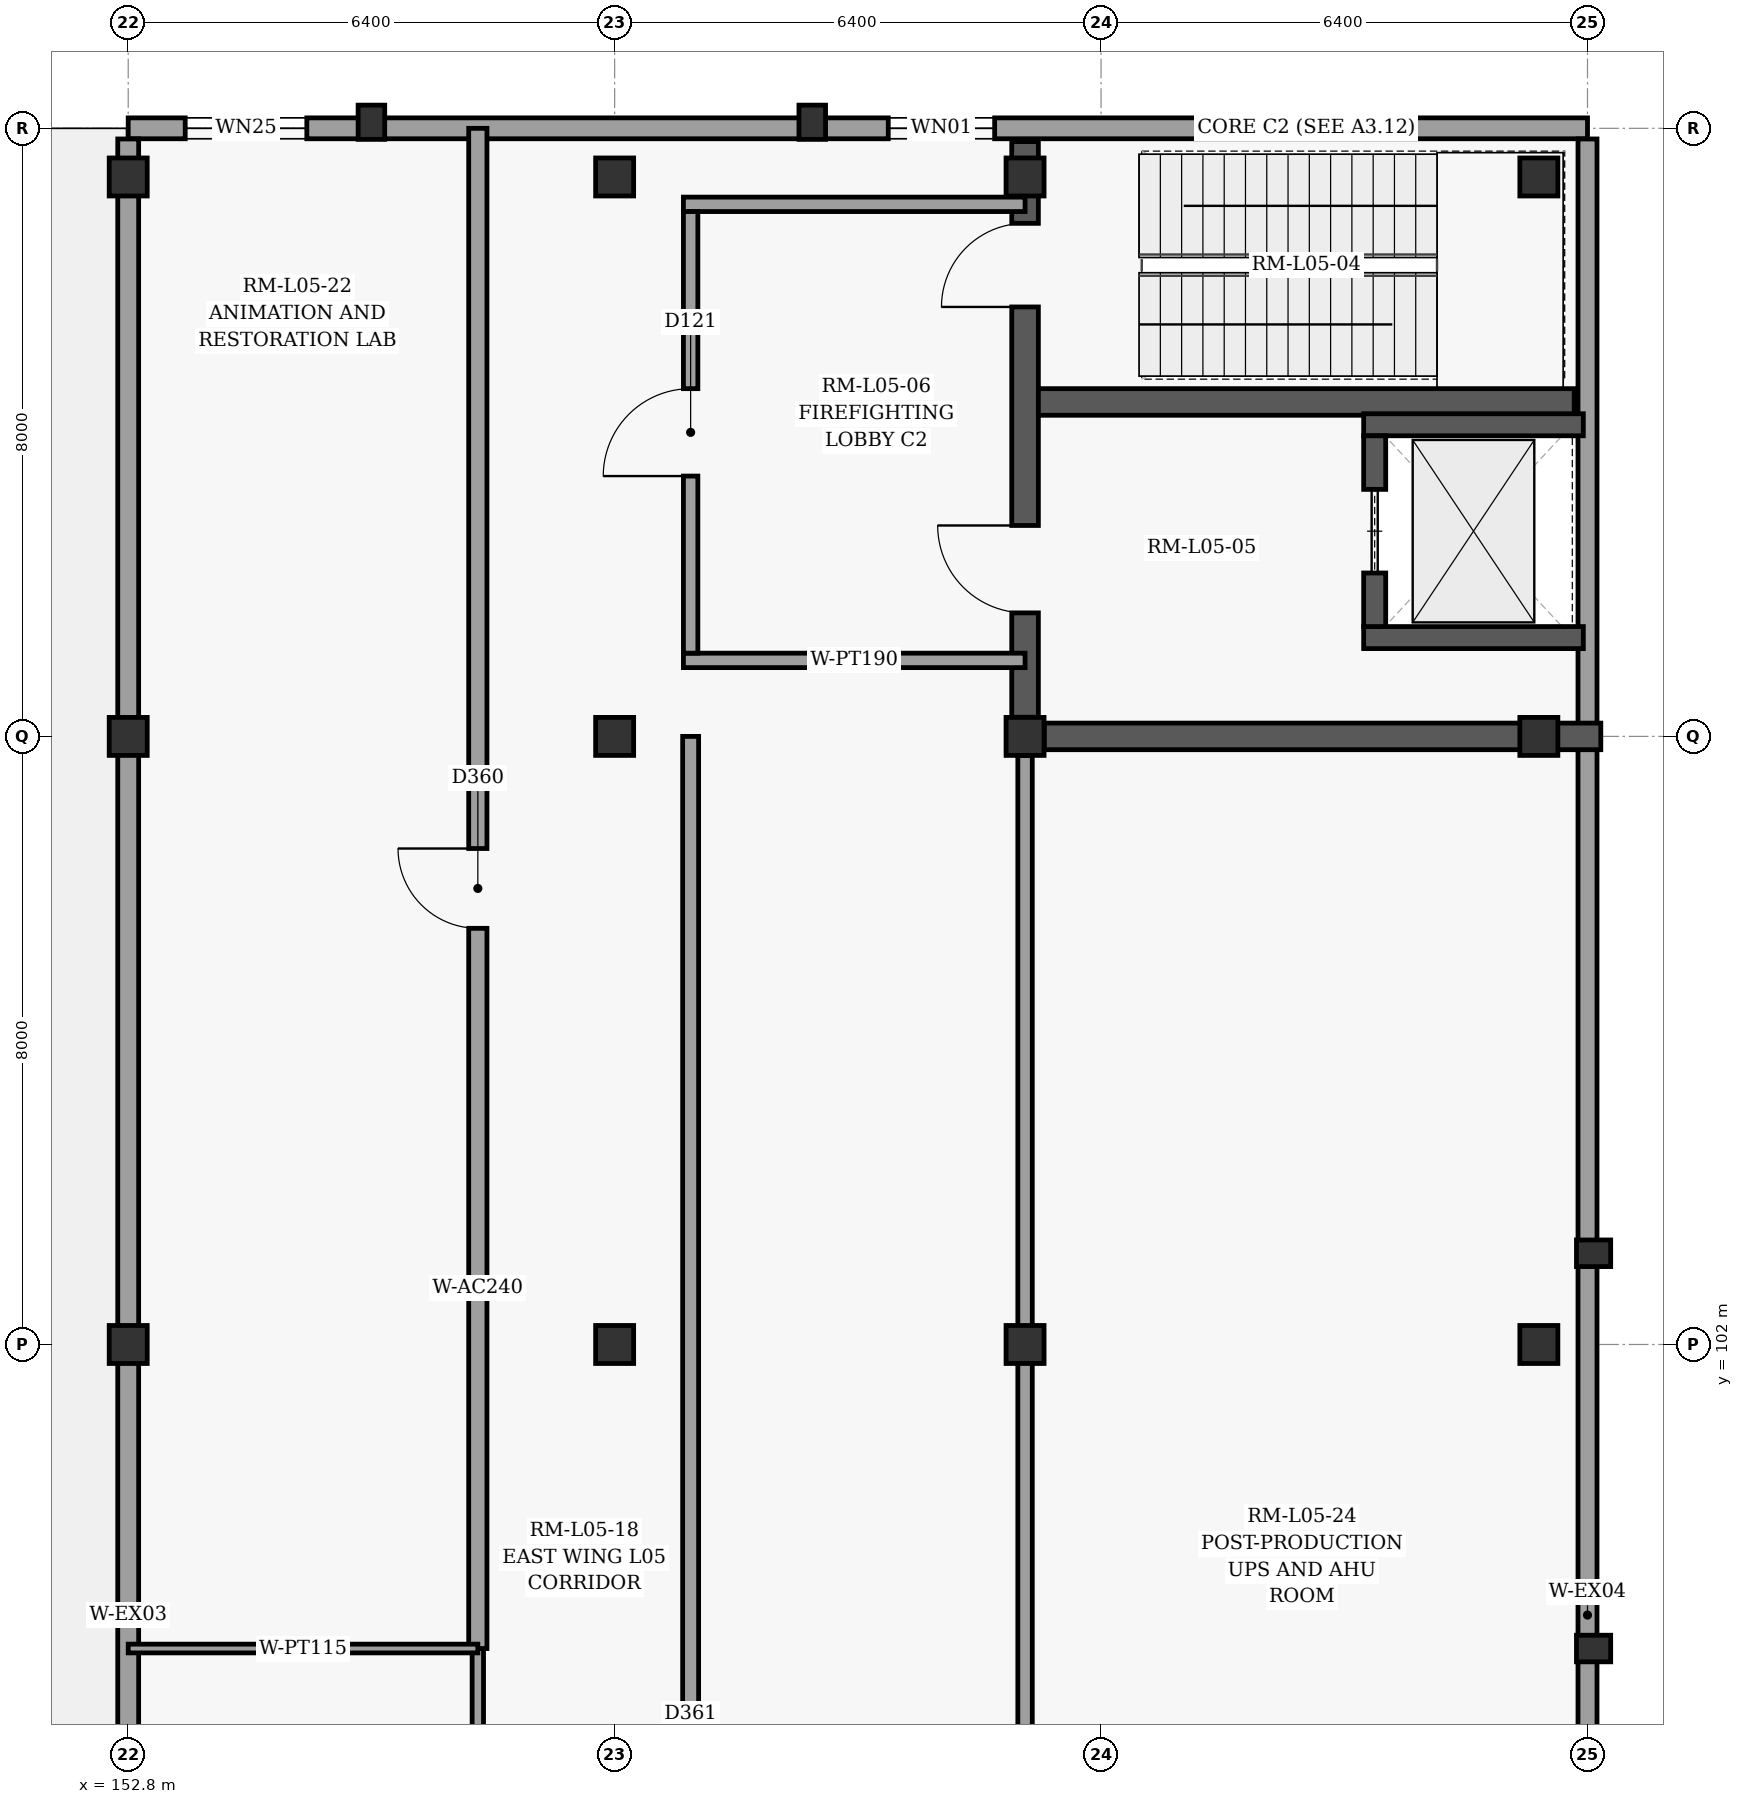
"""IFC4 building model, lengths in metres.
Left out: names, types, materials, properties, quantities, classifications, styles, units other than length and angle.
Written with IfcOpenShell. Run it as: python <this file> out.ifc"""

import sys

from ifc_helpers import new_model, si_unit, direction, frame, frame_2d, origin, origin_2d, place, context, subcontext, project, spatial, rectangle, extrude, element, fill, save


model = new_model("IFC4")
c1 = context("Model", 3, precision=1e-05, world=origin(), true_north=direction((0.0, 1.0)))
c2 = subcontext(c1, "Body", "Model", "MODEL_VIEW")
j1 = project(units=[si_unit("LENGTHUNIT", "METRE"), si_unit("PLANEANGLEUNIT", "RADIAN")], contexts=[c1])
p1 = place(None, origin())
s1 = spatial("IfcSite", under=j1, at=p1, CompositionType="ELEMENT")
p2 = place(p1, origin())
s2 = spatial("IfcBuilding", under=s1, at=p2, CompositionType="ELEMENT")
p3 = place(p2, frame((0.0, 0.0, 24.9)))
s3 = spatial("IfcBuildingStorey", under=s2, at=p3, CompositionType="ELEMENT", Elevation=24.9)
for number, where, z_axis, x_axis in (
    (1, (152.8, 102.0, 0.0), (0.0, 0.0, 1.0), (1.0, 0.0, 0.0)),
    (2, (152.8, 110.0, 0.0), (0.0, 0.0, 1.0), (1.0, 0.0, 0.0)),
    (3, (152.8, 117.36, 0.0), (0.0, 0.0, 1.0), (1.0, 0.0, 0.0)),
    (4, (159.2, 102.0, 0.0), (0.0, 0.0, 1.0), (1.0, 0.0, 0.0)),
    (5, (159.2, 110.0, 0.0), (0.0, 0.0, 1.0), (1.0, 0.0, 0.0)),
    (6, (159.2, 117.36, 0.0), (0.0, 0.0, 1.0), (1.0, 0.0, 0.0)),
    (7, (164.6, 102.0, 0.0), (0.0, 0.0, 1.0), (1.0, 0.0, 0.0)),
    (8, (164.6, 110.0, 0.0), (0.0, 0.0, 1.0), (1.0, 0.0, 0.0)),
    (9, (164.6, 117.36, 0.0), (0.0, 0.0, 1.0), (1.0, 0.0, 0.0)),
    (10, (171.36, 102.0, 0.0), (0.0, 0.0, 1.0), (1.0, 0.0, 0.0)),
    (11, (171.36, 110.0, 0.0), (0.0, 0.0, 1.0), (1.0, 0.0, 0.0)),
    (12, (171.36, 117.36, 0.0), (0.0, 0.0, 1.0), (1.0, 0.0, 0.0)),
):
    element("IfcColumn", number, at=place(p3, frame(where, z_axis=z_axis, x_axis=x_axis)), inside=s3, PredefinedType="COLUMN", context=c2, shape_type="SweptSolid", body=[
        extrude(rectangle(XDim=0.5, YDim=0.5, at=origin_2d()), origin(), (0.0, 0.0, 1.0), 4.5),
    ])
for number, where, z_axis, x_axis in (
    (13, (172.08, 98.0, 0.0), (0.0, 0.0, 1.0), (1.0, 0.0, 0.0)),
    (14, (172.08, 103.2, 0.0), (0.0, 0.0, 1.0), (1.0, 0.0, 0.0)),
    (15, (156.0, 118.08, 0.0), (0.0, 0.0, 1.0), (0.0, 1.0, 0.0)),
    (16, (161.8, 118.08, 0.0), (0.0, 0.0, 1.0), (0.0, 1.0, 0.0)),
):
    element("IfcColumn", number, at=place(p3, frame(where, z_axis=z_axis, x_axis=x_axis)), inside=s3, PredefinedType="PILASTER", context=c2, shape_type="SweptSolid", body=[
        extrude(rectangle(XDim=0.35, YDim=0.45, at=origin_2d()), origin(), (0.0, 0.0, 1.0), 4.5),
    ])
p4 = place(p3, frame((152.8, 118.0, 0.0), z_axis=(0.0, 0.0, 1.0), x_axis=(1.0, 0.0, 0.0)))
e17 = element("IfcWall", 17, at=p4, inside=s3, PredefinedType="SOLIDWALL", context=c2, shape_type="SweptSolid", body=[
    extrude(rectangle(XDim=19.2, YDim=0.275, at=frame_2d((9.6, 0.0))), origin(), (0.0, 0.0, 1.0), 4.3),
])
p5 = place(p4, frame((0.75, 0.0, 0.9)))
e18 = element("IfcOpeningElement", 18, at=p5, cuts=e17, PredefinedType="OPENING", context=c2, shape_type="SweptSolid", body=[
    extrude(rectangle(XDim=1.6, YDim=1.65, at=frame_2d((0.8, 0.825))), frame((0.0, 0.147, 0.0), z_axis=(0.0, -1.0, 0.0), x_axis=(1.0, 0.0, 0.0)), (0.0, 0.0, 1.0), 0.295),
])
p6 = place(p4, frame((10.0, 0.0, 0.9)))
e19 = element("IfcOpeningElement", 19, at=p6, cuts=e17, PredefinedType="OPENING", context=c2, shape_type="SweptSolid", body=[
    extrude(rectangle(XDim=1.4, YDim=2.1, at=frame_2d((0.7, 1.05))), frame((0.0, 0.147, 0.0), z_axis=(0.0, -1.0, 0.0), x_axis=(1.0, 0.0, 0.0)), (0.0, 0.0, 1.0), 0.295),
])
p7 = place(p3, frame((172.0, 117.86, 0.0), z_axis=(0.0, 0.0, 1.0), x_axis=(0.0, -1.0, 0.0)))
e20 = element("IfcWall", 20, at=p7, inside=s3, PredefinedType="SOLIDWALL", context=c2, shape_type="SweptSolid", body=[
    extrude(rectangle(XDim=46.12, YDim=0.25, at=frame_2d((23.06, 0.0))), origin(), (0.0, 0.0, 1.0), 4.3),
])
p8 = place(p3, frame((152.8, 71.74, 0.0), z_axis=(0.0, 0.0, 1.0), x_axis=(0.0, 1.0, 0.0)))
e21 = element("IfcWall", 21, at=p8, inside=s3, PredefinedType="SOLIDWALL", context=c2, shape_type="SweptSolid", body=[
    extrude(rectangle(XDim=46.12, YDim=0.275, at=frame_2d((23.06, 0.0))), origin(), (0.0, 0.0, 1.0), 3.45),
])
p9 = place(p3, frame((164.852, 110.0, 0.0), z_axis=(0.0, 0.0, 1.0), x_axis=(1.0, 0.0, 0.0)))
e22 = element("IfcWall", 22, at=p9, inside=s3, PredefinedType="SHEAR", context=c2, shape_type="SweptSolid", body=[
    extrude(rectangle(XDim=7.323, YDim=0.35, at=frame_2d((3.662, 0.0))), origin(), (0.0, 0.0, 1.0), 4.3),
])
p10 = place(p3, frame((164.6, 110.252, 0.0), z_axis=(0.0, 0.0, 1.0), x_axis=(0.0, 1.0, 0.0)))
e23 = element("IfcWall", 23, at=p10, inside=s3, PredefinedType="SHEAR", context=c2, shape_type="SweptSolid", body=[
    extrude(rectangle(XDim=7.573, YDim=0.35, at=frame_2d((3.787, 0.0))), origin(), (0.0, 0.0, 1.0), 4.3),
])
p11 = place(p10, frame((5.398, 0.0, 0.0)))
e24 = element("IfcOpeningElement", 24, at=p11, cuts=e23, PredefinedType="OPENING", context=c2, shape_type="SweptSolid", body=[
    extrude(rectangle(XDim=1.1, YDim=2.15, at=frame_2d((0.55, 1.075))), frame((0.0, 0.185, 0.0), z_axis=(0.0, -1.0, 0.0), x_axis=(1.0, 0.0, 0.0)), (0.0, 0.0, 1.0), 0.37),
])
p12 = place(p10, frame((1.373, 0.0, 0.0)))
e25 = element("IfcOpeningElement", 25, at=p12, cuts=e23, PredefinedType="OPENING", context=c2, shape_type="SweptSolid", body=[
    extrude(rectangle(XDim=1.15, YDim=2.2, at=frame_2d((0.575, 1.1))), frame((0.0, 0.185, 0.0), z_axis=(0.0, -1.0, 0.0), x_axis=(1.0, 0.0, 0.0)), (0.0, 0.0, 1.0), 0.37),
])
p13 = place(p3, frame((164.775, 114.4, 0.0), z_axis=(0.0, 0.0, 1.0), x_axis=(1.0, 0.0, 0.0)))
e26 = element("IfcWall", 26, at=p13, inside=s3, PredefinedType="SHEAR", context=c2, shape_type="SweptSolid", body=[
    extrude(rectangle(XDim=7.05, YDim=0.35, at=frame_2d((3.525, 0.0))), origin(), (0.0, 0.0, 1.0), 4.3),
])
for number, where, z_axis, x_axis in (
    (27, (169.055, 111.3, 0.0), (0.0, 0.0, 1.0), (1.0, 0.0, 0.0)),
    (28, (169.055, 114.1, 0.0), (0.0, 0.0, 1.0), (1.0, 0.0, 0.0)),
):
    element("IfcWall", number, at=place(p3, frame(where, z_axis=z_axis, x_axis=x_axis)), inside=s3, PredefinedType="SHEAR", context=c2, shape_type="SweptSolid", body=[
        extrude(rectangle(XDim=2.89, YDim=0.29, at=frame_2d((1.445, 0.0))), origin(), (0.0, 0.0, 1.0), 4.3),
    ])
p14 = place(p3, frame((169.2, 111.445, 0.0), z_axis=(0.0, 0.0, 1.0), x_axis=(0.0, 1.0, 0.0)))
e29 = element("IfcWall", 29, at=p14, inside=s3, PredefinedType="SHEAR", context=c2, shape_type="SweptSolid", body=[
    extrude(rectangle(XDim=2.51, YDim=0.29, at=frame_2d((1.255, 0.0))), origin(), (0.0, 0.0, 1.0), 4.3),
])
p15 = place(p14, frame((0.705, 0.0, 0.0)))
e30 = element("IfcOpeningElement", 30, at=p15, cuts=e29, PredefinedType="OPENING", context=c2, shape_type="SweptSolid", body=[
    extrude(rectangle(XDim=1.1, YDim=2.15, at=frame_2d((0.55, 1.075))), frame((0.0, 0.155, 0.0), z_axis=(0.0, -1.0, 0.0), x_axis=(1.0, 0.0, 0.0)), (0.0, 0.0, 1.0), 0.31),
])
p16 = place(p3, frame((160.105, 111.0, 0.0), z_axis=(0.0, 0.0, 1.0), x_axis=(1.0, 0.0, 0.0)))
e31 = element("IfcWall", 31, at=p16, inside=s3, PredefinedType="PARTITIONING", context=c2, shape_type="SweptSolid", body=[
    extrude(rectangle(XDim=4.495, YDim=0.19, at=frame_2d((2.248, 0.0))), origin(), (0.0, 0.0, 1.0), 4.3),
])
p17 = place(p3, frame((160.105, 117.0, 0.0), z_axis=(0.0, 0.0, 1.0), x_axis=(1.0, 0.0, 0.0)))
e32 = element("IfcWall", 32, at=p17, inside=s3, PredefinedType="PARTITIONING", context=c2, shape_type="SweptSolid", body=[
    extrude(rectangle(XDim=4.495, YDim=0.19, at=frame_2d((2.248, 0.0))), origin(), (0.0, 0.0, 1.0), 3.65),
])
p18 = place(p3, frame((160.2, 111.095, 0.0), z_axis=(0.0, 0.0, 1.0), x_axis=(0.0, 1.0, 0.0)))
e33 = element("IfcWall", 33, at=p18, inside=s3, PredefinedType="PARTITIONING", context=c2, shape_type="SweptSolid", body=[
    extrude(rectangle(XDim=5.81, YDim=0.19, at=frame_2d((2.905, 0.0))), origin(), (0.0, 0.0, 1.0), 4.3),
])
p19 = place(p18, frame((2.33, 0.0, 0.0)))
e34 = element("IfcOpeningElement", 34, at=p19, cuts=e33, PredefinedType="OPENING", context=c2, shape_type="SweptSolid", body=[
    extrude(rectangle(XDim=1.15, YDim=2.2, at=frame_2d((0.575, 1.1))), frame((0.0, 0.105, 0.0), z_axis=(0.0, -1.0, 0.0), x_axis=(1.0, 0.0, 0.0)), (0.0, 0.0, 1.0), 0.21),
])
p20 = place(p3, frame((157.4, 78.4, 0.0), z_axis=(0.0, 0.0, 1.0), x_axis=(0.0, 1.0, 0.0)))
e35 = element("IfcWall", 35, at=p20, inside=s3, PredefinedType="PARTITIONING", context=c2, shape_type="SweptSolid", body=[
    extrude(rectangle(XDim=19.6, YDim=0.15, at=frame_2d((9.8, 0.0))), origin(), (0.0, 0.0, 1.0), 4.3),
])
p21 = place(p20, frame((9.29, 0.0, 0.0)))
e36 = element("IfcOpeningElement", 36, at=p21, cuts=e35, PredefinedType="OPENING", context=c2, shape_type="SweptSolid", body=[
    extrude(rectangle(XDim=1.02, YDim=2.1, at=frame_2d((0.51, 1.05))), frame((0.0, 0.085, 0.0), z_axis=(0.0, -1.0, 0.0), x_axis=(1.0, 0.0, 0.0)), (0.0, 0.0, 1.0), 0.17),
])
p22 = place(p3, frame((157.4, 98.0, 0.0), z_axis=(0.0, 0.0, 1.0), x_axis=(0.0, 1.0, 0.0)))
e37 = element("IfcWall", 37, at=p22, inside=s3, PredefinedType="PARTITIONING", context=c2, shape_type="SweptSolid", body=[
    extrude(rectangle(XDim=20.0, YDim=0.24, at=frame_2d((10.0, 0.0))), origin(), (0.0, 0.0, 1.0), 4.3),
])
p23 = place(p22, frame((9.475, 0.0, 0.0)))
e38 = element("IfcOpeningElement", 38, at=p23, cuts=e37, PredefinedType="OPENING", context=c2, shape_type="SweptSolid", body=[
    extrude(rectangle(XDim=1.05, YDim=2.15, at=frame_2d((0.525, 1.075))), frame((0.0, 0.13, 0.0), z_axis=(0.0, -1.0, 0.0), x_axis=(1.0, 0.0, 0.0)), (0.0, 0.0, 1.0), 0.26),
])
p24 = place(p3, frame((160.2, 110.0, 0.0), z_axis=(0.0, 0.0, 1.0), x_axis=(0.0, -1.0, 0.0)))
e39 = element("IfcWall", 39, at=p24, inside=s3, PredefinedType="PARTITIONING", context=c2, shape_type="SweptSolid", body=[
    extrude(rectangle(XDim=30.4, YDim=0.21, at=frame_2d((15.2, 0.0))), origin(), (0.0, 0.0, 1.0), 4.3),
])
p25 = place(p24, frame((13.98, 0.0, 0.0)))
e40 = element("IfcOpeningElement", 40, at=p25, cuts=e39, PredefinedType="OPENING", context=c2, shape_type="SweptSolid", body=[
    extrude(rectangle(XDim=1.55, YDim=2.25, at=frame_2d((0.775, 1.125))), frame((0.0, 0.115, 0.0), z_axis=(0.0, -1.0, 0.0), x_axis=(1.0, 0.0, 0.0)), (0.0, 0.0, 1.0), 0.23),
])
p26 = place(p3, frame((152.8, 98.0, 0.0), z_axis=(0.0, 0.0, 1.0), x_axis=(1.0, 0.0, 0.0)))
e41 = element("IfcWall", 41, at=p26, inside=s3, PredefinedType="PARTITIONING", context=c2, shape_type="SweptSolid", body=[
    extrude(rectangle(XDim=4.6, YDim=0.115, at=frame_2d((2.3, 0.0))), origin(), (0.0, 0.0, 1.0), 4.3),
])
p27 = place(p3, frame((164.6, 109.748, 0.0), z_axis=(0.0, 0.0, 1.0), x_axis=(0.0, -1.0, 0.0)))
e42 = element("IfcWall", 42, at=p27, inside=s3, PredefinedType="PARTITIONING", context=c2, shape_type="SweptSolid", body=[
    extrude(rectangle(XDim=29.896, YDim=0.19, at=frame_2d((14.948, 0.0))), origin(), (0.0, 0.0, 1.0), 3.45),
])
p28 = place(p27, frame((14.38, 0.0, 0.0)))
e43 = element("IfcOpeningElement", 43, at=p28, cuts=e42, PredefinedType="OPENING", context=c2, shape_type="SweptSolid", body=[
    extrude(rectangle(XDim=0.98, YDim=2.1, at=frame_2d((0.49, 1.05))), frame((0.0, 0.105, 0.0), z_axis=(0.0, -1.0, 0.0), x_axis=(1.0, 0.0, 0.0)), (0.0, 0.0, 1.0), 0.21),
])
p29 = place(p5, origin())
e44 = element("IfcWindow", 44, at=p29, inside=s3, PartitioningType="SINGLE_PANEL", PredefinedType="WINDOW", context=c2, shape_type="SweptSolid", body=[
    extrude(rectangle(XDim=1.6, YDim=1.65, at=frame_2d((0.8, 0.825))), frame((0.0, 0.03, 0.0), z_axis=(0.0, -1.0, 0.0), x_axis=(1.0, 0.0, 0.0)), (0.0, 0.0, 1.0), 0.06),
])
fill(e18, e44)
p30 = place(p6, origin())
e45 = element("IfcWindow", 45, at=p30, inside=s3, PartitioningType="SINGLE_PANEL", PredefinedType="WINDOW", context=c2, shape_type="SweptSolid", body=[
    extrude(rectangle(XDim=1.4, YDim=2.1, at=frame_2d((0.7, 1.05))), frame((0.0, 0.03, 0.0), z_axis=(0.0, -1.0, 0.0), x_axis=(1.0, 0.0, 0.0)), (0.0, 0.0, 1.0), 0.06),
])
fill(e19, e45)
p31 = place(p11, origin())
e46 = element("IfcDoor", 46, at=p31, inside=s3, OperationType="SINGLE_SWING_LEFT", PredefinedType="DOOR", context=c2, shape_type="SweptSolid", body=[
    extrude(rectangle(XDim=1.1, YDim=2.15, at=frame_2d((0.55, 1.075))), frame((0.0, 0.025, 0.0), z_axis=(0.0, -1.0, 0.0), x_axis=(1.0, 0.0, 0.0)), (0.0, 0.0, 1.0), 0.05),
])
fill(e24, e46)
p32 = place(p12, origin())
e47 = element("IfcDoor", 47, at=p32, inside=s3, OperationType="SINGLE_SWING_RIGHT", PredefinedType="DOOR", context=c2, shape_type="SweptSolid", body=[
    extrude(rectangle(XDim=1.15, YDim=2.2, at=frame_2d((0.575, 1.1))), frame((0.0, 0.025, 0.0), z_axis=(0.0, -1.0, 0.0), x_axis=(1.0, 0.0, 0.0)), (0.0, 0.0, 1.0), 0.05),
])
fill(e25, e47)
p33 = place(p15, origin())
e48 = element("IfcDoor", 48, at=p33, inside=s3, OperationType="SLIDING_TO_LEFT", PredefinedType="DOOR", context=c2, shape_type="SweptSolid", body=[
    extrude(rectangle(XDim=1.1, YDim=2.15, at=frame_2d((0.55, 1.075))), frame((0.0, 0.025, 0.0), z_axis=(0.0, -1.0, 0.0), x_axis=(1.0, 0.0, 0.0)), (0.0, 0.0, 1.0), 0.05),
])
fill(e30, e48)
p34 = place(p19, origin())
e49 = element("IfcDoor", 49, at=p34, inside=s3, OperationType="SINGLE_SWING_LEFT", PredefinedType="DOOR", context=c2, shape_type="SweptSolid", body=[
    extrude(rectangle(XDim=1.15, YDim=2.2, at=frame_2d((0.575, 1.1))), frame((0.0, 0.025, 0.0), z_axis=(0.0, -1.0, 0.0), x_axis=(1.0, 0.0, 0.0)), (0.0, 0.0, 1.0), 0.05),
])
fill(e34, e49)
p35 = place(p23, origin())
e50 = element("IfcDoor", 50, at=p35, inside=s3, OperationType="SINGLE_SWING_RIGHT", PredefinedType="DOOR", context=c2, shape_type="SweptSolid", body=[
    extrude(rectangle(XDim=1.05, YDim=2.15, at=frame_2d((0.525, 1.075))), frame((0.0, 0.025, 0.0), z_axis=(0.0, -1.0, 0.0), x_axis=(1.0, 0.0, 0.0)), (0.0, 0.0, 1.0), 0.05),
])
fill(e38, e50)
save(model, sys.argv[1])
